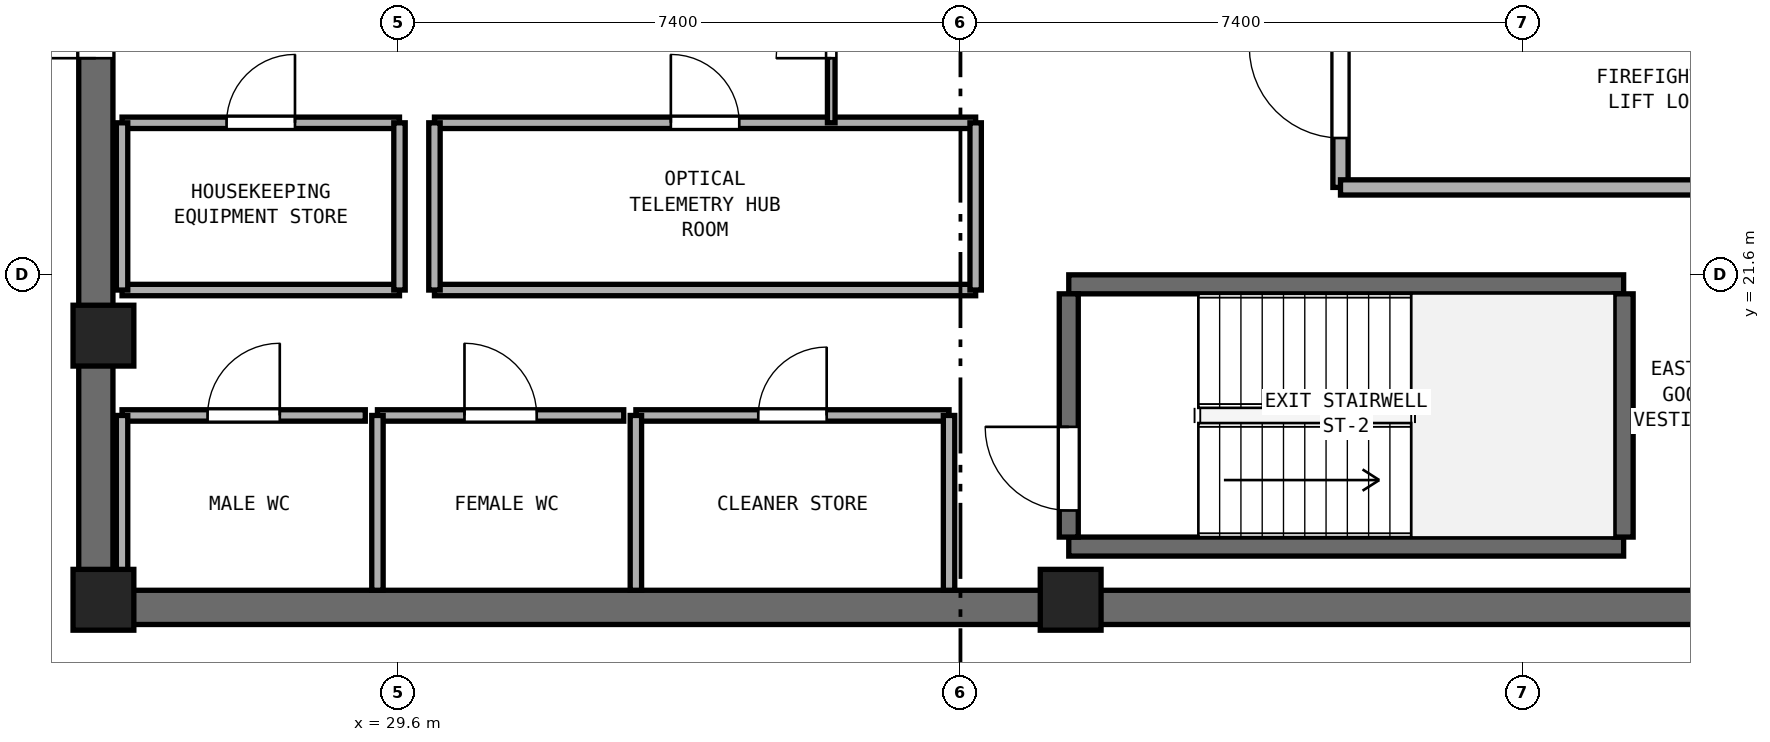
"""IFC4 building model, lengths in metres.
Left out: names, types, materials, properties, quantities, classifications, styles, units other than length and angle.
Written with IfcOpenShell. Run it as: python <this file> out.ifc"""

import sys

from ifc_helpers import new_model, si_unit, direction, frame, frame_2d, origin, origin_2d, place, context, subcontext, project, spatial, rectangle, extrude, element, fill, save


model = new_model("IFC4")
c1 = context("Model", 3, precision=1e-05, world=origin(), true_north=direction((0.0, 1.0)))
c2 = subcontext(c1, "Body", "Model", "MODEL_VIEW")
j1 = project(units=[si_unit("LENGTHUNIT", "METRE"), si_unit("PLANEANGLEUNIT", "RADIAN")], contexts=[c1])
p1 = place(None, origin())
s1 = spatial("IfcSite", under=j1, at=p1, CompositionType="ELEMENT")
p2 = place(p1, origin())
s2 = spatial("IfcBuilding", under=s1, at=p2, CompositionType="ELEMENT")
p3 = place(p2, frame((0.0, 0.0, 263.0)))
s3 = spatial("IfcBuildingStorey", under=s2, at=p3, CompositionType="ELEMENT", Elevation=263.0)
p4 = place(p3, frame((25.4, 17.225, 0.0), z_axis=(0.0, 0.0, 1.0), x_axis=(1.0, 0.0, 0.0)))
e1 = element("IfcWall", 1, at=p4, inside=s3, PredefinedType="SHEAR", context=c2, shape_type="SweptSolid", body=[
    extrude(rectangle(XDim=23.2, YDim=0.45, at=frame_2d((11.6, 0.0))), origin(), (0.0, 0.0, 1.0), 3.51),
])
p5 = place(p3, frame((25.625, 17.45, 0.0), z_axis=(0.0, 0.0, 1.0), x_axis=(0.0, 1.0, 0.0)))
e2 = element("IfcWall", 2, at=p5, inside=s3, PredefinedType="SHEAR", context=c2, shape_type="SweptSolid", body=[
    extrude(rectangle(XDim=15.5, YDim=0.45, at=frame_2d((7.75, 0.0))), origin(), (0.0, 0.0, 1.0), 3.51),
])
p6 = place(p5, frame((7.0, 0.0, 0.0)))
e3 = element("IfcOpeningElement", 3, at=p6, cuts=e2, PredefinedType="OPENING", context=c2, shape_type="SweptSolid", body=[
    extrude(rectangle(XDim=1.5, YDim=2.15, at=frame_2d((0.75, 1.075))), frame((0.0, 0.235, 0.0), z_axis=(0.0, -1.0, 0.0), x_axis=(1.0, 0.0, 0.0)), (0.0, 0.0, 1.0), 0.47),
])
for number, where, z_axis, x_axis in (
    (4, (25.725, 17.325, 0.0), (0.0, 0.0, 1.0), (1.0, 0.0, 0.0)),
    (5, (38.45, 17.325, 0.0), (0.0, 0.0, 1.0), (1.0, 0.0, 0.0)),
    (6, (25.725, 20.8, 0.0), (0.0, 0.0, 1.0), (1.0, 0.0, 0.0)),
):
    element("IfcColumn", number, at=place(p3, frame(where, z_axis=z_axis, x_axis=x_axis)), inside=s3, PredefinedType="PILASTER", context=c2, shape_type="SweptSolid", body=[
        extrude(rectangle(XDim=0.8, YDim=0.8, at=origin_2d()), origin(), (0.0, 0.0, 1.0), 3.8),
    ])
for number, where, z_axis, x_axis in (
    (7, (38.425, 18.025, 0.0), (0.0, 0.0, 1.0), (1.0, 0.0, 0.0)),
    (8, (38.425, 21.475, 0.0), (0.0, 0.0, 1.0), (1.0, 0.0, 0.0)),
):
    element("IfcWall", number, at=place(p3, frame(where, z_axis=z_axis, x_axis=x_axis)), inside=s3, PredefinedType="SHEAR", context=c2, shape_type="SweptSolid", body=[
        extrude(rectangle(XDim=7.3, YDim=0.25, at=frame_2d((3.65, 0.0))), origin(), (0.0, 0.0, 1.0), 3.51),
    ])
p7 = place(p3, frame((38.425, 18.15, 0.0), z_axis=(0.0, 0.0, 1.0), x_axis=(0.0, 1.0, 0.0)))
e9 = element("IfcWall", 9, at=p7, inside=s3, PredefinedType="SHEAR", context=c2, shape_type="SweptSolid", body=[
    extrude(rectangle(XDim=3.2, YDim=0.25, at=frame_2d((1.6, 0.0))), origin(), (0.0, 0.0, 1.0), 3.51),
])
p8 = place(p7, frame((0.35, 0.0, 0.0)))
e10 = element("IfcOpeningElement", 10, at=p8, cuts=e9, PredefinedType="OPENING", context=c2, shape_type="SweptSolid", body=[
    extrude(rectangle(XDim=1.1, YDim=2.15, at=frame_2d((0.55, 1.075))), frame((0.0, 0.135, 0.0), z_axis=(0.0, -1.0, 0.0), x_axis=(1.0, 0.0, 0.0)), (0.0, 0.0, 1.0), 0.27),
])
p9 = place(p3, frame((45.725, 18.15, 0.0), z_axis=(0.0, 0.0, 1.0), x_axis=(0.0, 1.0, 0.0)))
e11 = element("IfcWall", 11, at=p9, inside=s3, PredefinedType="SHEAR", context=c2, shape_type="SweptSolid", body=[
    extrude(rectangle(XDim=3.2, YDim=0.25, at=frame_2d((1.6, 0.0))), origin(), (0.0, 0.0, 1.0), 3.51),
])
p10 = place(p3, frame((42.0, 22.75, 0.0), z_axis=(0.0, 0.0, 1.0), x_axis=(0.0, 1.0, 0.0)))
e12 = element("IfcWall", 12, at=p10, inside=s3, PredefinedType="SOLIDWALL", context=c2, shape_type="SweptSolid", body=[
    extrude(rectangle(XDim=6.05, YDim=0.2, at=frame_2d((3.025, 0.0))), origin(), (0.0, 0.0, 1.0), 3.51),
])
p11 = place(p10, frame((0.65, 0.0, 0.0)))
e13 = element("IfcOpeningElement", 13, at=p11, cuts=e12, PredefinedType="OPENING", context=c2, shape_type="SweptSolid", body=[
    extrude(rectangle(XDim=1.2, YDim=2.15, at=frame_2d((0.6, 1.075))), frame((0.0, 0.11, 0.0), z_axis=(0.0, -1.0, 0.0), x_axis=(1.0, 0.0, 0.0)), (0.0, 0.0, 1.0), 0.22),
])
p12 = place(p3, frame((42.0, 22.75, 0.0), z_axis=(0.0, 0.0, 1.0), x_axis=(1.0, 0.0, 0.0)))
e14 = element("IfcWall", 14, at=p12, inside=s3, PredefinedType="SOLIDWALL", context=c2, shape_type="SweptSolid", body=[
    extrude(rectangle(XDim=6.15, YDim=0.2, at=frame_2d((3.075, 0.0))), origin(), (0.0, 0.0, 1.0), 3.51),
])
p13 = place(p3, frame((25.97, 19.75, 0.0), z_axis=(0.0, 0.0, 1.0), x_axis=(1.0, 0.0, 0.0)))
e15 = element("IfcWall", 15, at=p13, inside=s3, PredefinedType="PARTITIONING", context=c2, shape_type="SweptSolid", body=[
    extrude(rectangle(XDim=3.2, YDim=0.15, at=frame_2d((1.6, 0.0))), origin(), (0.0, 0.0, 1.0), 3.51),
])
p14 = place(p13, frame((1.125, 0.0, 0.0)))
e16 = element("IfcOpeningElement", 16, at=p14, cuts=e15, PredefinedType="OPENING", context=c2, shape_type="SweptSolid", body=[
    extrude(rectangle(XDim=0.95, YDim=2.1, at=frame_2d((0.475, 1.05))), frame((0.0, 0.085, 0.0), z_axis=(0.0, -1.0, 0.0), x_axis=(1.0, 0.0, 0.0)), (0.0, 0.0, 1.0), 0.17),
])
p15 = place(p3, frame((25.97, 17.45, 0.0), z_axis=(0.0, 0.0, 1.0), x_axis=(0.0, 1.0, 0.0)))
e17 = element("IfcWall", 17, at=p15, inside=s3, PredefinedType="PARTITIONING", context=c2, shape_type="SweptSolid", body=[
    extrude(rectangle(XDim=2.3, YDim=0.15, at=frame_2d((1.15, 0.0))), origin(), (0.0, 0.0, 1.0), 2.61),
])
p16 = place(p3, frame((29.33, 19.75, 0.0), z_axis=(0.0, 0.0, 1.0), x_axis=(1.0, 0.0, 0.0)))
e18 = element("IfcWall", 18, at=p16, inside=s3, PredefinedType="PARTITIONING", context=c2, shape_type="SweptSolid", body=[
    extrude(rectangle(XDim=3.24, YDim=0.15, at=frame_2d((1.62, 0.0))), origin(), (0.0, 0.0, 1.0), 3.51),
])
p17 = place(p16, frame((1.145, 0.0, 0.0)))
e19 = element("IfcOpeningElement", 19, at=p17, cuts=e18, PredefinedType="OPENING", context=c2, shape_type="SweptSolid", body=[
    extrude(rectangle(XDim=0.95, YDim=2.1, at=frame_2d((0.475, 1.05))), frame((0.0, 0.085, 0.0), z_axis=(0.0, -1.0, 0.0), x_axis=(1.0, 0.0, 0.0)), (0.0, 0.0, 1.0), 0.17),
])
p18 = place(p3, frame((29.33, 17.45, 0.0), z_axis=(0.0, 0.0, 1.0), x_axis=(0.0, 1.0, 0.0)))
e20 = element("IfcWall", 20, at=p18, inside=s3, PredefinedType="PARTITIONING", context=c2, shape_type="SweptSolid", body=[
    extrude(rectangle(XDim=2.3, YDim=0.15, at=frame_2d((1.15, 0.0))), origin(), (0.0, 0.0, 1.0), 3.51),
])
p19 = place(p3, frame((32.73, 19.75, 0.0), z_axis=(0.0, 0.0, 1.0), x_axis=(1.0, 0.0, 0.0)))
e21 = element("IfcWall", 21, at=p19, inside=s3, PredefinedType="PARTITIONING", context=c2, shape_type="SweptSolid", body=[
    extrude(rectangle(XDim=4.12, YDim=0.15, at=frame_2d((2.06, 0.0))), origin(), (0.0, 0.0, 1.0), 3.51),
])
p20 = place(p19, frame((1.61, 0.0, 0.0)))
e22 = element("IfcOpeningElement", 22, at=p20, cuts=e21, PredefinedType="OPENING", context=c2, shape_type="SweptSolid", body=[
    extrude(rectangle(XDim=0.9, YDim=2.1, at=frame_2d((0.45, 1.05))), frame((0.0, 0.085, 0.0), z_axis=(0.0, -1.0, 0.0), x_axis=(1.0, 0.0, 0.0)), (0.0, 0.0, 1.0), 0.17),
])
for number, where, z_axis, x_axis in (
    (23, (32.73, 17.45, 0.0), (0.0, 0.0, 1.0), (0.0, 1.0, 0.0)),
    (24, (36.85, 17.45, 0.0), (0.0, 0.0, 1.0), (0.0, 1.0, 0.0)),
):
    element("IfcWall", number, at=place(p3, frame(where, z_axis=z_axis, x_axis=x_axis)), inside=s3, PredefinedType="PARTITIONING", context=c2, shape_type="SweptSolid", body=[
        extrude(rectangle(XDim=2.3, YDim=0.15, at=frame_2d((1.15, 0.0))), origin(), (0.0, 0.0, 1.0), 3.51),
    ])
p21 = place(p3, frame((25.97, 21.4, 0.0), z_axis=(0.0, 0.0, 1.0), x_axis=(1.0, 0.0, 0.0)))
e25 = element("IfcWall", 25, at=p21, inside=s3, PredefinedType="PARTITIONING", context=c2, shape_type="SweptSolid", body=[
    extrude(rectangle(XDim=3.65, YDim=0.15, at=frame_2d((1.825, 0.0))), origin(), (0.0, 0.0, 1.0), 3.51),
])
p22 = place(p3, frame((25.97, 23.6, 0.0), z_axis=(0.0, 0.0, 1.0), x_axis=(1.0, 0.0, 0.0)))
e26 = element("IfcWall", 26, at=p22, inside=s3, PredefinedType="PARTITIONING", context=c2, shape_type="SweptSolid", body=[
    extrude(rectangle(XDim=3.65, YDim=0.15, at=frame_2d((1.825, 0.0))), origin(), (0.0, 0.0, 1.0), 3.51),
])
p23 = place(p22, frame((1.375, 0.0, 0.0)))
e27 = element("IfcOpeningElement", 27, at=p23, cuts=e26, PredefinedType="OPENING", context=c2, shape_type="SweptSolid", body=[
    extrude(rectangle(XDim=0.9, YDim=2.1, at=frame_2d((0.45, 1.05))), frame((0.0, 0.085, 0.0), z_axis=(0.0, -1.0, 0.0), x_axis=(1.0, 0.0, 0.0)), (0.0, 0.0, 1.0), 0.17),
])
p24 = place(p3, frame((25.97, 21.4, 0.0), z_axis=(0.0, 0.0, 1.0), x_axis=(0.0, 1.0, 0.0)))
e28 = element("IfcWall", 28, at=p24, inside=s3, PredefinedType="PARTITIONING", context=c2, shape_type="SweptSolid", body=[
    extrude(rectangle(XDim=2.2, YDim=0.15, at=frame_2d((1.1, 0.0))), origin(), (0.0, 0.0, 1.0), 2.61),
])
p25 = place(p3, frame((29.62, 21.4, 0.0), z_axis=(0.0, 0.0, 1.0), x_axis=(0.0, 1.0, 0.0)))
e29 = element("IfcWall", 29, at=p25, inside=s3, PredefinedType="PARTITIONING", context=c2, shape_type="SweptSolid", body=[
    extrude(rectangle(XDim=2.2, YDim=0.15, at=frame_2d((1.1, 0.0))), origin(), (0.0, 0.0, 1.0), 3.51),
])
p26 = place(p3, frame((30.08, 21.4, 0.0), z_axis=(0.0, 0.0, 1.0), x_axis=(1.0, 0.0, 0.0)))
e30 = element("IfcWall", 30, at=p26, inside=s3, PredefinedType="PARTITIONING", context=c2, shape_type="SweptSolid", body=[
    extrude(rectangle(XDim=7.12, YDim=0.15, at=frame_2d((3.56, 0.0))), origin(), (0.0, 0.0, 1.0), 3.51),
])
p27 = place(p3, frame((30.08, 23.6, 0.0), z_axis=(0.0, 0.0, 1.0), x_axis=(1.0, 0.0, 0.0)))
e31 = element("IfcWall", 31, at=p27, inside=s3, PredefinedType="PARTITIONING", context=c2, shape_type="SweptSolid", body=[
    extrude(rectangle(XDim=7.12, YDim=0.15, at=frame_2d((3.56, 0.0))), origin(), (0.0, 0.0, 1.0), 3.51),
])
p28 = place(p27, frame((3.11, 0.0, 0.0)))
e32 = element("IfcOpeningElement", 32, at=p28, cuts=e31, PredefinedType="OPENING", context=c2, shape_type="SweptSolid", body=[
    extrude(rectangle(XDim=0.9, YDim=2.1, at=frame_2d((0.45, 1.05))), frame((0.0, 0.085, 0.0), z_axis=(0.0, -1.0, 0.0), x_axis=(1.0, 0.0, 0.0)), (0.0, 0.0, 1.0), 0.17),
])
for number, where, z_axis, x_axis in (
    (33, (30.08, 21.4, 0.0), (0.0, 0.0, 1.0), (0.0, 1.0, 0.0)),
    (34, (37.2, 21.4, 0.0), (0.0, 0.0, 1.0), (0.0, 1.0, 0.0)),
):
    element("IfcWall", number, at=place(p3, frame(where, z_axis=z_axis, x_axis=x_axis)), inside=s3, PredefinedType="PARTITIONING", context=c2, shape_type="SweptSolid", body=[
        extrude(rectangle(XDim=2.2, YDim=0.15, at=frame_2d((1.1, 0.0))), origin(), (0.0, 0.0, 1.0), 3.51),
    ])
p29 = place(p3, frame((35.3, 23.6, 0.0), z_axis=(0.0, 0.0, 1.0), x_axis=(0.0, 1.0, 0.0)))
e35 = element("IfcWall", 35, at=p29, inside=s3, PredefinedType="PARTITIONING", context=c2, shape_type="SweptSolid", body=[
    extrude(rectangle(XDim=3.2, YDim=0.1, at=frame_2d((1.6, 0.0))), origin(), (0.0, 0.0, 1.0), 3.51),
])
p30 = place(p29, frame((0.85, 0.0, 0.0)))
e36 = element("IfcOpeningElement", 36, at=p30, cuts=e35, PredefinedType="OPENING", context=c2, shape_type="SweptSolid", body=[
    extrude(rectangle(XDim=1.45, YDim=2.12, at=frame_2d((0.725, 1.06))), frame((0.0, 0.06, 0.0), z_axis=(0.0, -1.0, 0.0), x_axis=(1.0, 0.0, 0.0)), (0.0, 0.0, 1.0), 0.12),
])
p31 = place(p8, origin())
e37 = element("IfcDoor", 37, at=p31, inside=s3, OperationType="SINGLE_SWING_RIGHT", PredefinedType="DOOR", context=c2, shape_type="SweptSolid", body=[
    extrude(rectangle(XDim=1.1, YDim=2.15, at=frame_2d((0.55, 1.075))), frame((0.0, 0.025, 0.0), z_axis=(0.0, -1.0, 0.0), x_axis=(1.0, 0.0, 0.0)), (0.0, 0.0, 1.0), 0.05),
])
fill(e10, e37)
p32 = place(p11, origin())
e38 = element("IfcDoor", 38, at=p32, inside=s3, OperationType="SINGLE_SWING_RIGHT", PredefinedType="DOOR", context=c2, shape_type="SweptSolid", body=[
    extrude(rectangle(XDim=1.2, YDim=2.15, at=frame_2d((0.6, 1.075))), frame((0.0, 0.025, 0.0), z_axis=(0.0, -1.0, 0.0), x_axis=(1.0, 0.0, 0.0)), (0.0, 0.0, 1.0), 0.05),
])
fill(e13, e38)
p33 = place(p6, origin())
e39 = element("IfcDoor", 39, at=p33, inside=s3, OperationType="DOUBLE_DOOR_SINGLE_SWING", PredefinedType="DOOR", context=c2, shape_type="SweptSolid", body=[
    extrude(rectangle(XDim=1.5, YDim=2.15, at=frame_2d((0.75, 1.075))), frame((0.0, 0.025, 0.0), z_axis=(0.0, -1.0, 0.0), x_axis=(1.0, 0.0, 0.0)), (0.0, 0.0, 1.0), 0.05),
])
fill(e3, e39)
p34 = place(p14, origin())
e40 = element("IfcDoor", 40, at=p34, inside=s3, OperationType="SINGLE_SWING_RIGHT", PredefinedType="DOOR", context=c2, shape_type="SweptSolid", body=[
    extrude(rectangle(XDim=0.95, YDim=2.1, at=frame_2d((0.475, 1.05))), frame((0.0, 0.025, 0.0), z_axis=(0.0, -1.0, 0.0), x_axis=(1.0, 0.0, 0.0)), (0.0, 0.0, 1.0), 0.05),
])
fill(e16, e40)
p35 = place(p17, origin())
e41 = element("IfcDoor", 41, at=p35, inside=s3, OperationType="SINGLE_SWING_LEFT", PredefinedType="DOOR", context=c2, shape_type="SweptSolid", body=[
    extrude(rectangle(XDim=0.95, YDim=2.1, at=frame_2d((0.475, 1.05))), frame((0.0, 0.025, 0.0), z_axis=(0.0, -1.0, 0.0), x_axis=(1.0, 0.0, 0.0)), (0.0, 0.0, 1.0), 0.05),
])
fill(e19, e41)
p36 = place(p20, origin())
e42 = element("IfcDoor", 42, at=p36, inside=s3, OperationType="SINGLE_SWING_RIGHT", PredefinedType="DOOR", context=c2, shape_type="SweptSolid", body=[
    extrude(rectangle(XDim=0.9, YDim=2.1, at=frame_2d((0.45, 1.05))), frame((0.0, 0.025, 0.0), z_axis=(0.0, -1.0, 0.0), x_axis=(1.0, 0.0, 0.0)), (0.0, 0.0, 1.0), 0.05),
])
fill(e22, e42)
p37 = place(p23, origin())
e43 = element("IfcDoor", 43, at=p37, inside=s3, OperationType="SINGLE_SWING_RIGHT", PredefinedType="DOOR", context=c2, shape_type="SweptSolid", body=[
    extrude(rectangle(XDim=0.9, YDim=2.1, at=frame_2d((0.45, 1.05))), frame((0.0, 0.025, 0.0), z_axis=(0.0, -1.0, 0.0), x_axis=(1.0, 0.0, 0.0)), (0.0, 0.0, 1.0), 0.05),
])
fill(e27, e43)
p38 = place(p28, origin())
e44 = element("IfcDoor", 44, at=p38, inside=s3, OperationType="SINGLE_SWING_LEFT", PredefinedType="DOOR", context=c2, shape_type="SweptSolid", body=[
    extrude(rectangle(XDim=0.9, YDim=2.1, at=frame_2d((0.45, 1.05))), frame((0.0, 0.025, 0.0), z_axis=(0.0, -1.0, 0.0), x_axis=(1.0, 0.0, 0.0)), (0.0, 0.0, 1.0), 0.05),
])
fill(e32, e44)
p39 = place(p30, origin())
e45 = element("IfcDoor", 45, at=p39, inside=s3, OperationType="DOUBLE_DOOR_SINGLE_SWING", PredefinedType="DOOR", context=c2, shape_type="SweptSolid", body=[
    extrude(rectangle(XDim=1.45, YDim=2.12, at=frame_2d((0.725, 1.06))), frame((0.0, 0.025, 0.0), z_axis=(0.0, -1.0, 0.0), x_axis=(1.0, 0.0, 0.0)), (0.0, 0.0, 1.0), 0.05),
])
fill(e36, e45)
save(model, sys.argv[1])
